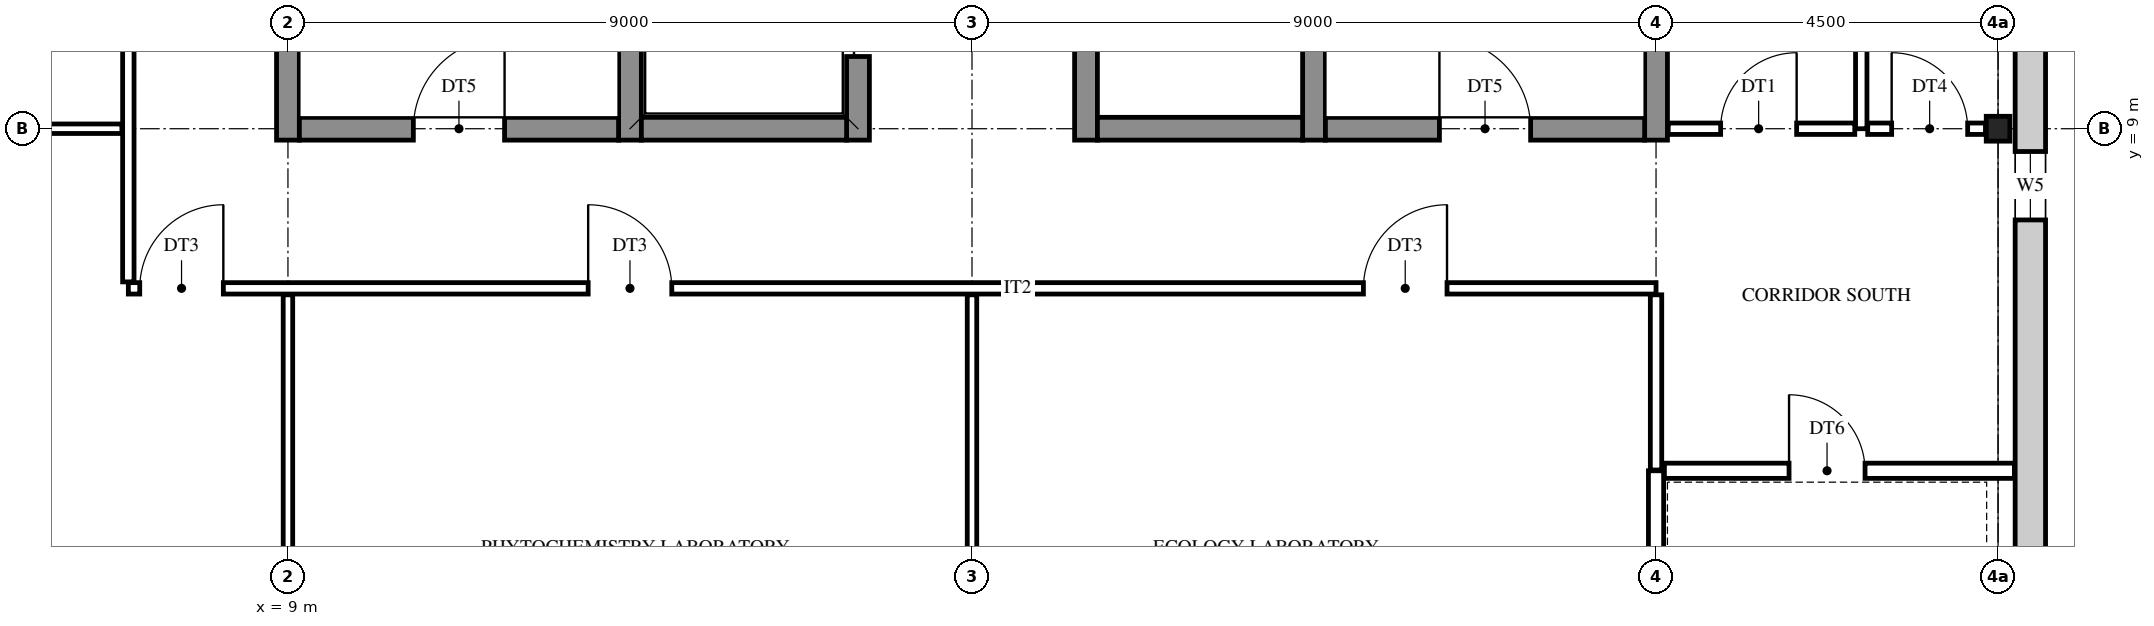
"""IFC4 building model, lengths in metres.
Left out: names, types, materials, properties, quantities, classifications, styles, units other than length and angle.
Written with IfcOpenShell. Run it as: python <this file> out.ifc"""

import sys

from ifc_helpers import new_model, si_unit, direction, frame, frame_2d, origin, origin_2d, place, context, subcontext, project, spatial, rectangle, i_section, extrude, element, fill, save


model = new_model("IFC4")
c1 = context("Model", 3, precision=1e-05, world=origin(), true_north=direction((0.0, 1.0)))
c2 = subcontext(c1, "Body", "Model", "MODEL_VIEW")
j1 = project(units=[si_unit("LENGTHUNIT", "METRE"), si_unit("PLANEANGLEUNIT", "RADIAN")], contexts=[c1])
p1 = place(None, origin())
s1 = spatial("IfcSite", under=j1, at=p1, CompositionType="ELEMENT")
p2 = place(p1, origin())
s2 = spatial("IfcBuilding", under=s1, at=p2, CompositionType="ELEMENT")
p3 = place(p2, frame((0.0, 0.0, 23.4)))
s3 = spatial("IfcBuildingStorey", under=s2, at=p3, CompositionType="ELEMENT", Elevation=23.4)
p4 = place(p3, frame((31.5, 9.0, 0.0), z_axis=(0.0, 0.0, 1.0), x_axis=(1.0, 0.0, 0.0)))
e1 = element("IfcColumn", 1, at=p4, inside=s3, PredefinedType="COLUMN", context=c2, shape_type="SweptSolid", body=[
    extrude(i_section(OverallWidth=0.311, OverallDepth=0.327, WebThickness=0.016, FlangeThickness=0.025, FilletRadius=0.017, at=origin_2d()), origin(), (0.0, 0.0, 1.0), 4.2),
])
for number, where, z_axis, x_axis in (
    (2, (9.0, 8.85, 0.0), (0.0, 0.0, 1.0), (0.0, 1.0, 0.0)),
    (3, (13.5, 8.85, 0.0), (0.0, 0.0, 1.0), (0.0, 1.0, 0.0)),
):
    element("IfcWall", number, at=place(p3, frame(where, z_axis=z_axis, x_axis=x_axis)), inside=s3, PredefinedType="SHEAR", context=c2, shape_type="SweptSolid", body=[
        extrude(rectangle(XDim=9.3, YDim=0.3, at=frame_2d((4.65, 0.0))), origin(), (0.0, 0.0, 1.0), 4.2),
    ])
p5 = place(p3, frame((16.5, 8.85, 0.0), z_axis=(0.0, 0.0, 1.0), x_axis=(0.0, 1.0, 0.0)))
e4 = element("IfcWall", 4, at=p5, inside=s3, PredefinedType="SHEAR", context=c2, shape_type="SweptSolid", body=[
    extrude(rectangle(XDim=9.3, YDim=0.3, at=frame_2d((4.65, 0.0))), origin(), (0.0, 0.0, 1.0), 4.2),
])
p6 = place(p5, frame((1.1, 0.0, 0.0)))
e5 = element("IfcOpeningElement", 5, at=p6, cuts=e4, PredefinedType="OPENING", context=c2, shape_type="SweptSolid", body=[
    extrude(rectangle(XDim=1.1, YDim=2.1, at=frame_2d((0.55, 1.05))), frame((0.0, 0.16, 0.0), z_axis=(0.0, -1.0, 0.0), x_axis=(1.0, 0.0, 0.0)), (0.0, 0.0, 1.0), 0.32),
])
p7 = place(p5, frame((4.1, 0.0, 0.0)))
e6 = element("IfcOpeningElement", 6, at=p7, cuts=e4, PredefinedType="OPENING", context=c2, shape_type="SweptSolid", body=[
    extrude(rectangle(XDim=1.1, YDim=2.1, at=frame_2d((0.55, 1.05))), frame((0.0, 0.16, 0.0), z_axis=(0.0, -1.0, 0.0), x_axis=(1.0, 0.0, 0.0)), (0.0, 0.0, 1.0), 0.32),
])
p8 = place(p3, frame((19.5, 8.85, 0.0), z_axis=(0.0, 0.0, 1.0), x_axis=(0.0, 1.0, 0.0)))
e7 = element("IfcWall", 7, at=p8, inside=s3, PredefinedType="SHEAR", context=c2, shape_type="SweptSolid", body=[
    extrude(rectangle(XDim=9.3, YDim=0.3, at=frame_2d((4.65, 0.0))), origin(), (0.0, 0.0, 1.0), 4.2),
])
p9 = place(p8, frame((3.95, 0.0, 0.0)))
e8 = element("IfcOpeningElement", 8, at=p9, cuts=e7, PredefinedType="OPENING", context=c2, shape_type="SweptSolid", body=[
    extrude(rectangle(XDim=1.4, YDim=2.1, at=frame_2d((0.7, 1.05))), frame((0.0, 0.16, 0.0), z_axis=(0.0, -1.0, 0.0), x_axis=(1.0, 0.0, 0.0)), (0.0, 0.0, 1.0), 0.32),
])
p10 = place(p8, frame((7.1, 0.0, 0.0)))
e9 = element("IfcOpeningElement", 9, at=p10, cuts=e7, PredefinedType="OPENING", context=c2, shape_type="SweptSolid", body=[
    extrude(rectangle(XDim=1.1, YDim=2.1, at=frame_2d((0.55, 1.05))), frame((0.0, 0.16, 0.0), z_axis=(0.0, -1.0, 0.0), x_axis=(1.0, 0.0, 0.0)), (0.0, 0.0, 1.0), 0.32),
])
for number, where, z_axis, x_axis in (
    (10, (22.5, 8.85, 0.0), (0.0, 0.0, 1.0), (0.0, 1.0, 0.0)),
    (11, (27.0, 8.85, 0.0), (0.0, 0.0, 1.0), (0.0, 1.0, 0.0)),
):
    element("IfcWall", number, at=place(p3, frame(where, z_axis=z_axis, x_axis=x_axis)), inside=s3, PredefinedType="SHEAR", context=c2, shape_type="SweptSolid", body=[
        extrude(rectangle(XDim=9.3, YDim=0.3, at=frame_2d((4.65, 0.0))), origin(), (0.0, 0.0, 1.0), 4.2),
    ])
p11 = place(p3, frame((9.15, 9.0, 0.0), z_axis=(0.0, 0.0, 1.0), x_axis=(1.0, 0.0, 0.0)))
e12 = element("IfcWall", 12, at=p11, inside=s3, PredefinedType="SHEAR", context=c2, shape_type="SweptSolid", body=[
    extrude(rectangle(XDim=4.2, YDim=0.3, at=frame_2d((2.1, 0.0))), origin(), (0.0, 0.0, 1.0), 4.2),
])
p12 = place(p11, frame((1.5, 0.0, 0.0)))
e13 = element("IfcOpeningElement", 13, at=p12, cuts=e12, PredefinedType="OPENING", context=c2, shape_type="SweptSolid", body=[
    extrude(rectangle(XDim=1.2, YDim=2.1, at=frame_2d((0.6, 1.05))), frame((0.0, 0.16, 0.0), z_axis=(0.0, -1.0, 0.0), x_axis=(1.0, 0.0, 0.0)), (0.0, 0.0, 1.0), 0.32),
])
for number, where, z_axis, x_axis in (
    (14, (13.65, 9.0, 0.0), (0.0, 0.0, 1.0), (1.0, 0.0, 0.0)),
    (15, (19.65, 9.0, 0.0), (0.0, 0.0, 1.0), (1.0, 0.0, 0.0)),
):
    element("IfcWall", number, at=place(p3, frame(where, z_axis=z_axis, x_axis=x_axis)), inside=s3, PredefinedType="SHEAR", context=c2, shape_type="SweptSolid", body=[
        extrude(rectangle(XDim=2.7, YDim=0.3, at=frame_2d((1.35, 0.0))), origin(), (0.0, 0.0, 1.0), 4.2),
    ])
p13 = place(p3, frame((22.65, 9.0, 0.0), z_axis=(0.0, 0.0, 1.0), x_axis=(1.0, 0.0, 0.0)))
e16 = element("IfcWall", 16, at=p13, inside=s3, PredefinedType="SHEAR", context=c2, shape_type="SweptSolid", body=[
    extrude(rectangle(XDim=4.2, YDim=0.3, at=frame_2d((2.1, 0.0))), origin(), (0.0, 0.0, 1.0), 4.2),
])
p14 = place(p13, frame((1.5, 0.0, 0.0)))
e17 = element("IfcOpeningElement", 17, at=p14, cuts=e16, PredefinedType="OPENING", context=c2, shape_type="SweptSolid", body=[
    extrude(rectangle(XDim=1.2, YDim=2.1, at=frame_2d((0.6, 1.05))), frame((0.0, 0.16, 0.0), z_axis=(0.0, -1.0, 0.0), x_axis=(1.0, 0.0, 0.0)), (0.0, 0.0, 1.0), 0.32),
])
p15 = place(p3, frame((31.925, 27.225, 0.0), z_axis=(0.0, 0.0, 1.0), x_axis=(0.0, -1.0, 0.0)))
e18 = element("IfcWall", 18, at=p15, inside=s3, PredefinedType="STANDARD", context=c2, shape_type="SweptSolid", body=[
    extrude(rectangle(XDim=27.45, YDim=0.4, at=frame_2d((13.725, 0.0))), origin(), (0.0, 0.0, 1.0), 4.2),
])
p16 = place(p15, frame((26.025, 0.0, 0.9)))
e19 = element("IfcOpeningElement", 19, at=p16, cuts=e18, PredefinedType="OPENING", context=c2, shape_type="SweptSolid", body=[
    extrude(rectangle(XDim=0.9, YDim=2.0, at=frame_2d((0.45, 1.0))), frame((0.0, 0.21, 0.0), z_axis=(0.0, -1.0, 0.0), x_axis=(1.0, 0.0, 0.0)), (0.0, 0.0, 1.0), 0.42),
])
p17 = place(p15, frame((18.525, 0.0, 0.9)))
e20 = element("IfcOpeningElement", 20, at=p17, cuts=e18, PredefinedType="OPENING", context=c2, shape_type="SweptSolid", body=[
    extrude(rectangle(XDim=0.9, YDim=2.0, at=frame_2d((0.45, 1.0))), frame((0.0, 0.21, 0.0), z_axis=(0.0, -1.0, 0.0), x_axis=(1.0, 0.0, 0.0)), (0.0, 0.0, 1.0), 0.42),
])
p18 = place(p15, frame((15.675, 0.0, 1.6)))
e21 = element("IfcOpeningElement", 21, at=p18, cuts=e18, PredefinedType="OPENING", context=c2, shape_type="SweptSolid", body=[
    extrude(rectangle(XDim=0.6, YDim=0.9, at=frame_2d((0.3, 0.45))), frame((0.0, 0.21, 0.0), z_axis=(0.0, -1.0, 0.0), x_axis=(1.0, 0.0, 0.0)), (0.0, 0.0, 1.0), 0.42),
])
p19 = place(p15, frame((11.175, 0.0, 1.6)))
e22 = element("IfcOpeningElement", 22, at=p19, cuts=e18, PredefinedType="OPENING", context=c2, shape_type="SweptSolid", body=[
    extrude(rectangle(XDim=0.6, YDim=0.9, at=frame_2d((0.3, 0.45))), frame((0.0, 0.21, 0.0), z_axis=(0.0, -1.0, 0.0), x_axis=(1.0, 0.0, 0.0)), (0.0, 0.0, 1.0), 0.42),
])
p20 = place(p15, frame((8.025, 0.0, 0.9)))
e23 = element("IfcOpeningElement", 23, at=p20, cuts=e18, PredefinedType="OPENING", context=c2, shape_type="SweptSolid", body=[
    extrude(rectangle(XDim=0.9, YDim=2.0, at=frame_2d((0.45, 1.0))), frame((0.0, 0.21, 0.0), z_axis=(0.0, -1.0, 0.0), x_axis=(1.0, 0.0, 0.0)), (0.0, 0.0, 1.0), 0.42),
])
p21 = place(p15, frame((0.525, 0.0, 0.9)))
e24 = element("IfcOpeningElement", 24, at=p21, cuts=e18, PredefinedType="OPENING", context=c2, shape_type="SweptSolid", body=[
    extrude(rectangle(XDim=0.9, YDim=2.0, at=frame_2d((0.45, 1.0))), frame((0.0, 0.21, 0.0), z_axis=(0.0, -1.0, 0.0), x_axis=(1.0, 0.0, 0.0)), (0.0, 0.0, 1.0), 0.42),
])
p22 = place(p3, frame((6.9, 6.985, 0.0), z_axis=(0.0, 0.0, 1.0), x_axis=(0.0, 1.0, 0.0)))
e25 = element("IfcWall", 25, at=p22, inside=s3, PredefinedType="PARTITIONING", context=c2, shape_type="SweptSolid", body=[
    extrude(rectangle(XDim=13.115, YDim=0.15, at=frame_2d((6.558, 0.0))), origin(), (0.0, 0.0, 1.0), 3.537),
])
p23 = place(p22, frame((11.865, 0.0, 0.0)))
e26 = element("IfcOpeningElement", 26, at=p23, cuts=e25, PredefinedType="OPENING", context=c2, shape_type="SweptSolid", body=[
    extrude(rectangle(XDim=1.1, YDim=2.1, at=frame_2d((0.55, 1.05))), frame((0.0, 0.085, 0.0), z_axis=(0.0, -1.0, 0.0), x_axis=(1.0, 0.0, 0.0)), (0.0, 0.0, 1.0), 0.17),
])
p24 = place(p22, frame((3.765, 0.0, 0.0)))
e27 = element("IfcOpeningElement", 27, at=p24, cuts=e25, PredefinedType="OPENING", context=c2, shape_type="SweptSolid", body=[
    extrude(rectangle(XDim=1.0, YDim=2.1, at=frame_2d((0.5, 1.05))), frame((0.0, 0.085, 0.0), z_axis=(0.0, -1.0, 0.0), x_axis=(1.0, 0.0, 0.0)), (0.0, 0.0, 1.0), 0.17),
])
p25 = place(p22, frame((8.265, 0.0, 0.0)))
e28 = element("IfcOpeningElement", 28, at=p25, cuts=e25, PredefinedType="OPENING", context=c2, shape_type="SweptSolid", body=[
    extrude(rectangle(XDim=1.0, YDim=2.1, at=frame_2d((0.5, 1.05))), frame((0.0, 0.085, 0.0), z_axis=(0.0, -1.0, 0.0), x_axis=(1.0, 0.0, 0.0)), (0.0, 0.0, 1.0), 0.17),
])
for number, where, z_axis, x_axis in (
    (29, (9.0, 0.174, 0.0), (0.0, 0.0, 1.0), (0.0, 1.0, 0.0)),
    (30, (18.0, 0.174, 0.0), (0.0, 0.0, 1.0), (0.0, 1.0, 0.0)),
):
    element("IfcWall", number, at=place(p3, frame(where, z_axis=z_axis, x_axis=x_axis)), inside=s3, PredefinedType="PARTITIONING", context=c2, shape_type="SweptSolid", body=[
        extrude(rectangle(XDim=6.641, YDim=0.125, at=frame_2d((3.321, 0.0))), origin(), (0.0, 0.0, 1.0), 3.537),
    ])
p26 = place(p3, frame((27.0, 0.174, 0.0), z_axis=(0.0, 0.0, 1.0), x_axis=(0.0, 1.0, 0.0)))
e31 = element("IfcWall", 31, at=p26, inside=s3, PredefinedType="PARTITIONING", context=c2, shape_type="SweptSolid", body=[
    extrude(rectangle(XDim=4.326, YDim=0.2, at=frame_2d((2.163, 0.0))), origin(), (0.0, 0.0, 1.0), 3.537),
])
p27 = place(p3, frame((27.0, 4.51, 0.0), z_axis=(0.0, 0.0, 1.0), x_axis=(0.0, 1.0, 0.0)))
e32 = element("IfcWall", 32, at=p27, inside=s3, PredefinedType="PARTITIONING", context=c2, shape_type="SweptSolid", body=[
    extrude(rectangle(XDim=2.305, YDim=0.15, at=frame_2d((1.152, 0.0))), origin(), (0.0, 0.0, 1.0), 3.537),
])
p28 = place(p3, frame((29.7, 9.0, 0.0), z_axis=(0.0, 0.0, 1.0), x_axis=(0.0, 1.0, 0.0)))
e33 = element("IfcWall", 33, at=p28, inside=s3, PredefinedType="PARTITIONING", context=c2, shape_type="SweptSolid", body=[
    extrude(rectangle(XDim=6.3, YDim=0.15, at=frame_2d((3.15, 0.0))), origin(), (0.0, 0.0, 1.0), 3.537),
])
p29 = place(p28, frame((4.0, 0.0, 0.0)))
e34 = element("IfcOpeningElement", 34, at=p29, cuts=e33, PredefinedType="OPENING", context=c2, shape_type="SweptSolid", body=[
    extrude(rectangle(XDim=1.0, YDim=2.1, at=frame_2d((0.5, 1.05))), frame((0.0, 0.085, 0.0), z_axis=(0.0, -1.0, 0.0), x_axis=(1.0, 0.0, 0.0)), (0.0, 0.0, 1.0), 0.17),
])
p30 = place(p3, frame((27.11, 4.5, 0.0), z_axis=(0.0, 0.0, 1.0), x_axis=(1.0, 0.0, 0.0)))
e35 = element("IfcWall", 35, at=p30, inside=s3, PredefinedType="PARTITIONING", context=c2, shape_type="SweptSolid", body=[
    extrude(rectangle(XDim=4.605, YDim=0.2, at=frame_2d((2.302, 0.0))), origin(), (0.0, 0.0, 1.0), 3.537),
])
p31 = place(p30, frame((1.64, 0.0, 0.0)))
e36 = element("IfcOpeningElement", 36, at=p31, cuts=e35, PredefinedType="OPENING", context=c2, shape_type="SweptSolid", body=[
    extrude(rectangle(XDim=1.0, YDim=2.1, at=frame_2d((0.5, 1.05))), frame((0.0, 0.11, 0.0), z_axis=(0.0, -1.0, 0.0), x_axis=(1.0, 0.0, 0.0)), (0.0, 0.0, 1.0), 0.22),
])
p32 = place(p3, frame((6.9, 6.9, 0.0), z_axis=(0.0, 0.0, 1.0), x_axis=(1.0, 0.0, 0.0)))
e37 = element("IfcWall", 37, at=p32, inside=s3, PredefinedType="PARTITIONING", context=c2, shape_type="SweptSolid", body=[
    extrude(rectangle(XDim=20.1, YDim=0.15, at=frame_2d((10.05, 0.0))), origin(), (0.0, 0.0, 1.0), 3.537),
])
p33 = place(p32, frame((0.15, 0.0, 0.0)))
e38 = element("IfcOpeningElement", 38, at=p33, cuts=e37, PredefinedType="OPENING", context=c2, shape_type="SweptSolid", body=[
    extrude(rectangle(XDim=1.1, YDim=2.1, at=frame_2d((0.55, 1.05))), frame((0.0, 0.085, 0.0), z_axis=(0.0, -1.0, 0.0), x_axis=(1.0, 0.0, 0.0)), (0.0, 0.0, 1.0), 0.17),
])
p34 = place(p32, frame((6.05, 0.0, 0.0)))
e39 = element("IfcOpeningElement", 39, at=p34, cuts=e37, PredefinedType="OPENING", context=c2, shape_type="SweptSolid", body=[
    extrude(rectangle(XDim=1.1, YDim=2.1, at=frame_2d((0.55, 1.05))), frame((0.0, 0.085, 0.0), z_axis=(0.0, -1.0, 0.0), x_axis=(1.0, 0.0, 0.0)), (0.0, 0.0, 1.0), 0.17),
])
p35 = place(p32, frame((16.25, 0.0, 0.0)))
e40 = element("IfcOpeningElement", 40, at=p35, cuts=e37, PredefinedType="OPENING", context=c2, shape_type="SweptSolid", body=[
    extrude(rectangle(XDim=1.1, YDim=2.1, at=frame_2d((0.55, 1.05))), frame((0.0, 0.085, 0.0), z_axis=(0.0, -1.0, 0.0), x_axis=(1.0, 0.0, 0.0)), (0.0, 0.0, 1.0), 0.17),
])
p36 = place(p3, frame((0.166, 9.0, 0.0), z_axis=(0.0, 0.0, 1.0), x_axis=(1.0, 0.0, 0.0)))
e41 = element("IfcWall", 41, at=p36, inside=s3, PredefinedType="PARTITIONING", context=c2, shape_type="SweptSolid", body=[
    extrude(rectangle(XDim=6.649, YDim=0.125, at=frame_2d((3.325, 0.0))), origin(), (0.0, 0.0, 1.0), 3.537),
])
p37 = place(p3, frame((27.16, 9.0, 0.0), z_axis=(0.0, 0.0, 1.0), x_axis=(1.0, 0.0, 0.0)))
e42 = element("IfcWall", 42, at=p37, inside=s3, PredefinedType="PARTITIONING", context=c2, shape_type="SweptSolid", body=[
    extrude(rectangle(XDim=2.455, YDim=0.15, at=frame_2d((1.228, 0.0))), origin(), (0.0, 0.0, 1.0), 3.537),
])
p38 = place(p37, frame((0.69, 0.0, 0.0)))
e43 = element("IfcOpeningElement", 43, at=p38, cuts=e42, PredefinedType="OPENING", context=c2, shape_type="SweptSolid", body=[
    extrude(rectangle(XDim=1.0, YDim=2.1, at=frame_2d((0.5, 1.05))), frame((0.0, 0.085, 0.0), z_axis=(0.0, -1.0, 0.0), x_axis=(1.0, 0.0, 0.0)), (0.0, 0.0, 1.0), 0.17),
])
p39 = place(p3, frame((29.785, 9.0, 0.0), z_axis=(0.0, 0.0, 1.0), x_axis=(1.0, 0.0, 0.0)))
e44 = element("IfcWall", 44, at=p39, inside=s3, PredefinedType="PARTITIONING", context=c2, shape_type="SweptSolid", body=[
    extrude(rectangle(XDim=1.55, YDim=0.15, at=frame_2d((0.775, 0.0))), origin(), (0.0, 0.0, 1.0), 3.537),
])
p40 = place(p39, frame((0.315, 0.0, 0.0)))
e45 = element("IfcOpeningElement", 45, at=p40, cuts=e44, PredefinedType="OPENING", context=c2, shape_type="SweptSolid", body=[
    extrude(rectangle(XDim=1.0, YDim=2.1, at=frame_2d((0.5, 1.05))), frame((0.0, 0.085, 0.0), z_axis=(0.0, -1.0, 0.0), x_axis=(1.0, 0.0, 0.0)), (0.0, 0.0, 1.0), 0.17),
])
p41 = place(p17, origin())
e46 = element("IfcWindow", 46, at=p41, inside=s3, PartitioningType="SINGLE_PANEL", PredefinedType="WINDOW", context=c2, shape_type="SweptSolid", body=[
    extrude(rectangle(XDim=0.9, YDim=2.0, at=frame_2d((0.45, 1.0))), frame((0.0, 0.03, 0.0), z_axis=(0.0, -1.0, 0.0), x_axis=(1.0, 0.0, 0.0)), (0.0, 0.0, 1.0), 0.06),
])
fill(e20, e46)
p42 = place(p12, origin())
e47 = element("IfcDoor", 47, at=p42, inside=s3, OperationType="SINGLE_SWING_RIGHT", PredefinedType="DOOR", context=c2, shape_type="SweptSolid", body=[
    extrude(rectangle(XDim=1.2, YDim=2.1, at=frame_2d((0.6, 1.05))), frame((0.0, 0.025, 0.0), z_axis=(0.0, -1.0, 0.0), x_axis=(1.0, 0.0, 0.0)), (0.0, 0.0, 1.0), 0.05),
])
fill(e13, e47)
p43 = place(p14, origin())
e48 = element("IfcDoor", 48, at=p43, inside=s3, OperationType="SINGLE_SWING_LEFT", PredefinedType="DOOR", context=c2, shape_type="SweptSolid", body=[
    extrude(rectangle(XDim=1.2, YDim=2.1, at=frame_2d((0.6, 1.05))), frame((0.0, 0.025, 0.0), z_axis=(0.0, -1.0, 0.0), x_axis=(1.0, 0.0, 0.0)), (0.0, 0.0, 1.0), 0.05),
])
fill(e17, e48)
p44 = place(p38, origin())
e49 = element("IfcDoor", 49, at=p44, inside=s3, OperationType="SINGLE_SWING_RIGHT", PredefinedType="DOOR", context=c2, shape_type="SweptSolid", body=[
    extrude(rectangle(XDim=1.0, YDim=2.1, at=frame_2d((0.5, 1.05))), frame((0.0, 0.025, 0.0), z_axis=(0.0, -1.0, 0.0), x_axis=(1.0, 0.0, 0.0)), (0.0, 0.0, 1.0), 0.05),
])
fill(e43, e49)
p45 = place(p40, origin())
e50 = element("IfcDoor", 50, at=p45, inside=s3, OperationType="SINGLE_SWING_LEFT", PredefinedType="DOOR", context=c2, shape_type="SweptSolid", body=[
    extrude(rectangle(XDim=1.0, YDim=2.1, at=frame_2d((0.5, 1.05))), frame((0.0, 0.025, 0.0), z_axis=(0.0, -1.0, 0.0), x_axis=(1.0, 0.0, 0.0)), (0.0, 0.0, 1.0), 0.05),
])
fill(e45, e50)
p46 = place(p31, frame((1.0, 0.0, 0.0), z_axis=(0.0, 0.0, 1.0), x_axis=(-1.0, 0.0, 0.0)))
e51 = element("IfcDoor", 51, at=p46, inside=s3, OperationType="SINGLE_SWING_LEFT", PredefinedType="DOOR", context=c2, shape_type="SweptSolid", body=[
    extrude(rectangle(XDim=1.0, YDim=2.1, at=frame_2d((0.5, 1.05))), frame((0.0, 0.025, 0.0), z_axis=(0.0, -1.0, 0.0), x_axis=(1.0, 0.0, 0.0)), (0.0, 0.0, 1.0), 0.05),
])
fill(e36, e51)
p47 = place(p33, frame((1.1, 0.0, 0.0), z_axis=(0.0, 0.0, 1.0), x_axis=(-1.0, 0.0, 0.0)))
e52 = element("IfcDoor", 52, at=p47, inside=s3, OperationType="SINGLE_SWING_RIGHT", PredefinedType="DOOR", context=c2, shape_type="SweptSolid", body=[
    extrude(rectangle(XDim=1.1, YDim=2.1, at=frame_2d((0.55, 1.05))), frame((0.0, 0.025, 0.0), z_axis=(0.0, -1.0, 0.0), x_axis=(1.0, 0.0, 0.0)), (0.0, 0.0, 1.0), 0.05),
])
fill(e38, e52)
p48 = place(p34, frame((1.1, 0.0, 0.0), z_axis=(0.0, 0.0, 1.0), x_axis=(-1.0, 0.0, 0.0)))
e53 = element("IfcDoor", 53, at=p48, inside=s3, OperationType="SINGLE_SWING_LEFT", PredefinedType="DOOR", context=c2, shape_type="SweptSolid", body=[
    extrude(rectangle(XDim=1.1, YDim=2.1, at=frame_2d((0.55, 1.05))), frame((0.0, 0.025, 0.0), z_axis=(0.0, -1.0, 0.0), x_axis=(1.0, 0.0, 0.0)), (0.0, 0.0, 1.0), 0.05),
])
fill(e39, e53)
p49 = place(p35, frame((1.1, 0.0, 0.0), z_axis=(0.0, 0.0, 1.0), x_axis=(-1.0, 0.0, 0.0)))
e54 = element("IfcDoor", 54, at=p49, inside=s3, OperationType="SINGLE_SWING_RIGHT", PredefinedType="DOOR", context=c2, shape_type="SweptSolid", body=[
    extrude(rectangle(XDim=1.1, YDim=2.1, at=frame_2d((0.55, 1.05))), frame((0.0, 0.025, 0.0), z_axis=(0.0, -1.0, 0.0), x_axis=(1.0, 0.0, 0.0)), (0.0, 0.0, 1.0), 0.05),
])
fill(e40, e54)
p50 = place(p6, origin())
e55 = element("IfcDoor", 55, at=p50, inside=s3, OperationType="DOUBLE_DOOR_SLIDING", PredefinedType="DOOR", context=c2, shape_type="SweptSolid", body=[
    extrude(rectangle(XDim=1.1, YDim=2.1, at=frame_2d((0.55, 1.05))), frame((0.0, 0.025, 0.0), z_axis=(0.0, -1.0, 0.0), x_axis=(1.0, 0.0, 0.0)), (0.0, 0.0, 1.0), 0.05),
])
fill(e5, e55)
save(model, sys.argv[1])
